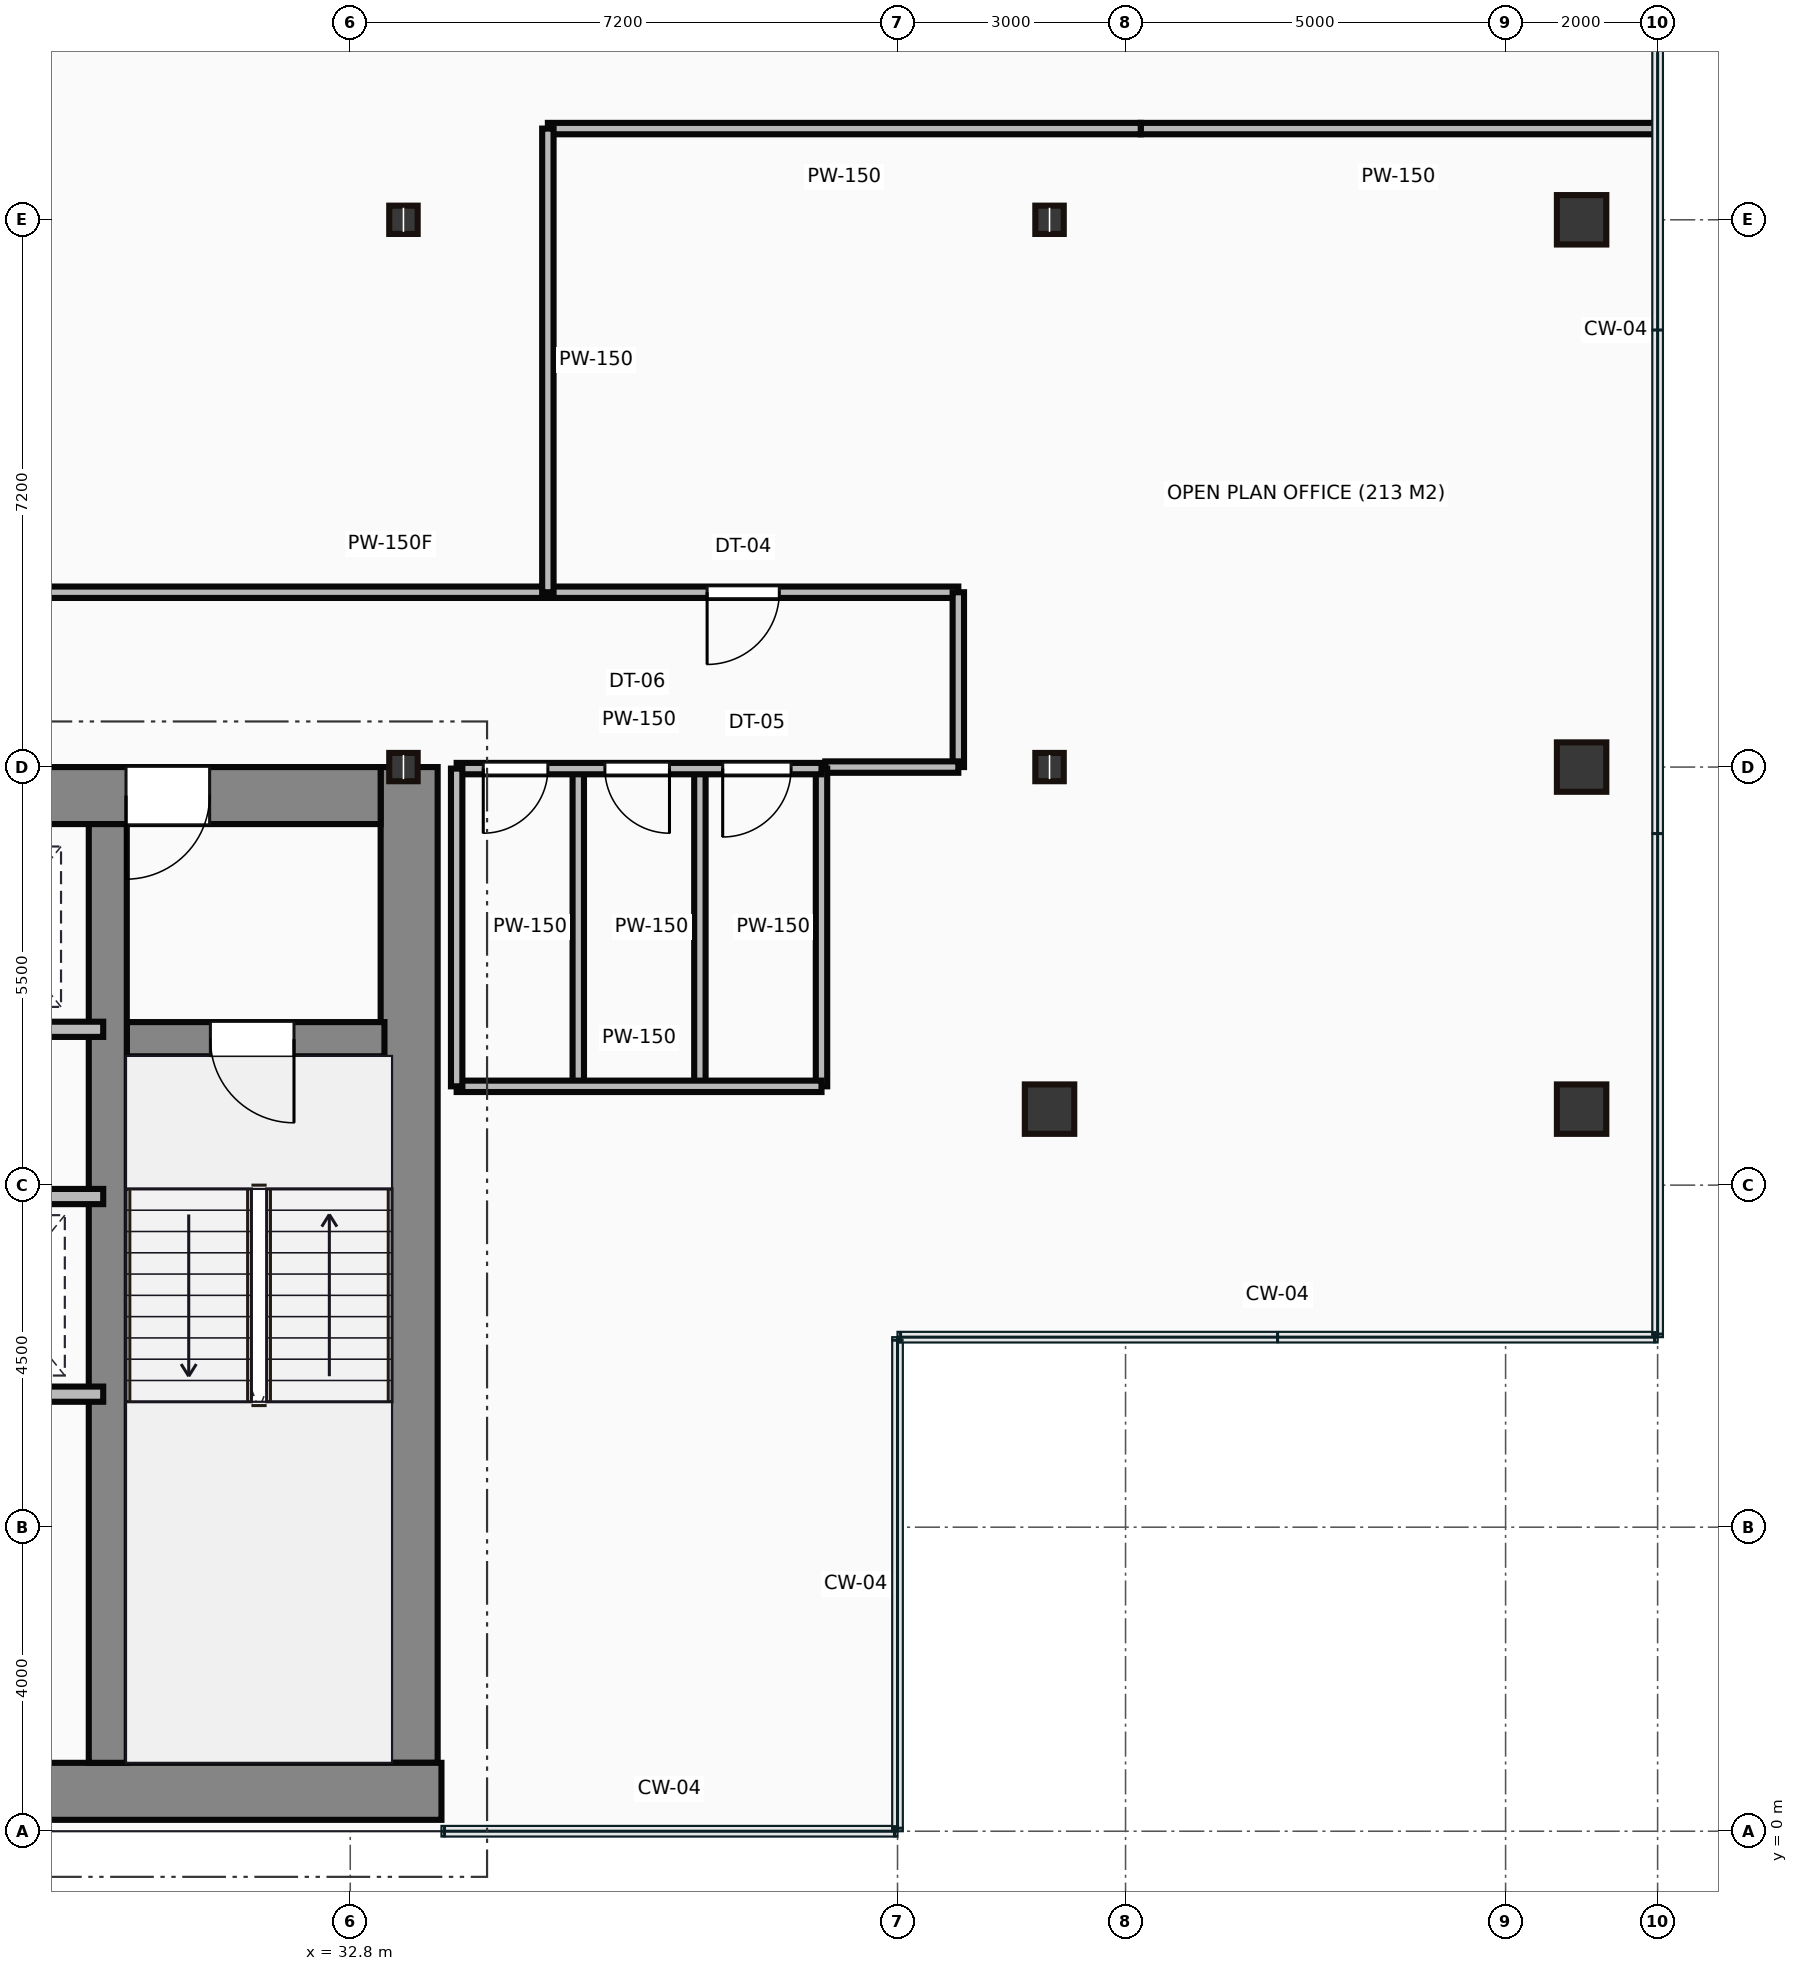
"""IFC4 building model, lengths in metres.
Left out: names, types, materials, properties, quantities, classifications, styles, units other than length and angle.
Written with IfcOpenShell. Run it as: python <this file> out.ifc"""

import sys

from ifc_helpers import new_model, si_unit, direction, frame, frame_2d, origin, origin_2d, place, context, subcontext, project, spatial, rectangle, hollow_rectangle, i_section, extrude, source, transform, mapped, element, fill, save


model = new_model("IFC4")
c1 = context("Model", 3, precision=1e-05, world=origin(), true_north=direction((0.0, 1.0)))
c2 = subcontext(c1, "Body", "Model", "MODEL_VIEW")
j1 = project(units=[si_unit("LENGTHUNIT", "METRE"), si_unit("PLANEANGLEUNIT", "RADIAN")], contexts=[c1])
p1 = place(None, origin())
s1 = spatial("IfcSite", under=j1, at=p1, CompositionType="ELEMENT")
p2 = place(p1, origin())
s2 = spatial("IfcBuilding", under=s1, at=p2, CompositionType="ELEMENT")
p3 = place(p2, frame((0.0, 0.0, 147.9)))
s3 = spatial("IfcBuildingStorey", under=s2, at=p3, CompositionType="ELEMENT", Elevation=147.9)
m1 = source(origin(), c2, "Body", "SweptSolid", [
    extrude(rectangle(XDim=29.5, YDim=0.75, at=frame_2d((14.75, 0.0))), origin(), (0.0, 0.0, 1.0), 3.65),
])
p4 = place(p3, frame((4.5, 0.525, 0.0), z_axis=(0.0, 0.0, 1.0), x_axis=(1.0, 0.0, 0.0)))
e1 = element("IfcWall", 1, at=p4, inside=s3, PredefinedType="SHEAR", context=c2, shape_type="MappedRepresentation", body=[
    mapped(m1, transform((0.0, 0.0, 0.0))),
])
m2 = source(origin(), c2, "Body", "SweptSolid", [
    extrude(rectangle(XDim=13.1, YDim=0.75, at=frame_2d((6.55, 0.0))), origin(), (0.0, 0.0, 1.0), 3.65),
])
p5 = place(p3, frame((33.575, 0.9, 0.0), z_axis=(0.0, 0.0, 1.0), x_axis=(0.0, 1.0, 0.0)))
e2 = element("IfcWall", 2, at=p5, inside=s3, PredefinedType="SHEAR", context=c2, shape_type="MappedRepresentation", body=[
    mapped(m2, transform((0.0, 0.0, 0.0))),
])
m3 = source(origin(), c2, "Body", "SweptSolid", [
    extrude(rectangle(XDim=12.6, YDim=0.75, at=frame_2d((6.3, 0.0))), origin(), (0.0, 0.0, 1.0), 3.65),
])
p6 = place(p3, frame((20.6, 13.625, 0.0), z_axis=(0.0, 0.0, 1.0), x_axis=(1.0, 0.0, 0.0)))
e3 = element("IfcWall", 3, at=p6, inside=s3, PredefinedType="SHEAR", context=c2, shape_type="MappedRepresentation", body=[
    mapped(m3, transform((0.0, 0.0, 0.0))),
])
p7 = place(p6, frame((9.25, 0.0, 0.0)))
e4 = element("IfcOpeningElement", 4, at=p7, cuts=e3, PredefinedType="OPENING", context=c2, shape_type="SweptSolid", body=[
    extrude(rectangle(XDim=1.1, YDim=2.15, at=frame_2d((0.55, 1.075))), frame((0.0, 0.385, 0.0), z_axis=(0.0, -1.0, 0.0), x_axis=(1.0, 0.0, 0.0)), (0.0, 0.0, 1.0), 0.77),
])
m4 = source(origin(), c2, "Body", "SweptSolid", [
    extrude(rectangle(XDim=12.35, YDim=0.5, at=frame_2d((6.175, 0.0))), origin(), (0.0, 0.0, 1.0), 3.65),
])
p8 = place(p3, frame((29.61, 0.9, 0.0), z_axis=(0.0, 0.0, 1.0), x_axis=(0.0, 1.0, 0.0)))
e5 = element("IfcWall", 5, at=p8, inside=s3, PredefinedType="SHEAR", context=c2, shape_type="MappedRepresentation", body=[
    mapped(m4, transform((0.0, 0.0, 0.0))),
])
m5 = source(origin(), c2, "Body", "SweptSolid", [
    extrude(rectangle(XDim=3.39, YDim=0.45, at=frame_2d((1.695, 0.0))), origin(), (0.0, 0.0, 1.0), 3.65),
])
p9 = place(p3, frame((29.86, 10.42, 0.0), z_axis=(0.0, 0.0, 1.0), x_axis=(1.0, 0.0, 0.0)))
e6 = element("IfcWall", 6, at=p9, inside=s3, PredefinedType="SHEAR", context=c2, shape_type="MappedRepresentation", body=[
    mapped(m5, transform((0.0, 0.0, 0.0))),
])
p10 = place(p9, frame((1.1, 0.0, 0.0)))
e7 = element("IfcOpeningElement", 7, at=p10, cuts=e6, PredefinedType="OPENING", context=c2, shape_type="SweptSolid", body=[
    extrude(rectangle(XDim=1.1, YDim=2.15, at=frame_2d((0.55, 1.075))), frame((0.0, 0.235, 0.0), z_axis=(0.0, -1.0, 0.0), x_axis=(1.0, 0.0, 0.0)), (0.0, 0.0, 1.0), 0.47),
])
m6 = source(origin(), c2, "Body", "SweptSolid", [
    extrude(i_section(OverallWidth=0.374, OverallDepth=0.372, WebThickness=0.016, FlangeThickness=0.026, at=origin_2d()), origin(), (0.0, 0.0, 1.0), 3.65),
])
for number, where, z_axis, x_axis in (
    (8, (33.5, 14.0, 0.0), (0.0, 0.0, 1.0), (1.0, 0.0, 0.0)),
    (9, (33.5, 21.2, 0.0), (0.0, 0.0, 1.0), (1.0, 0.0, 0.0)),
):
    element("IfcColumn", number, at=place(p3, frame(where, z_axis=z_axis, x_axis=x_axis)), inside=s3, PredefinedType="COLUMN", context=c2, shape_type="MappedRepresentation", body=[
        mapped(m6, transform((0.0, 0.0, 0.0))),
    ])
m7 = source(origin(), c2, "Body", "SweptSolid", [
    extrude(hollow_rectangle(XDim=0.65, YDim=0.65, WallThickness=0.032, at=origin_2d()), origin(), (0.0, 0.0, 1.0), 3.65),
])
p11 = place(p3, frame((42.0, 9.5, 0.0), z_axis=(0.0, 0.0, 1.0), x_axis=(1.0, 0.0, 0.0)))
e10 = element("IfcColumn", 10, at=p11, inside=s3, PredefinedType="COLUMN", context=c2, shape_type="MappedRepresentation", body=[
    mapped(m7, transform((0.0, 0.0, 0.0))),
])
for number, where, z_axis, x_axis in (
    (11, (42.0, 14.0, 0.0), (0.0, 0.0, 1.0), (1.0, 0.0, 0.0)),
    (12, (42.0, 21.2, 0.0), (0.0, 0.0, 1.0), (1.0, 0.0, 0.0)),
):
    element("IfcColumn", number, at=place(p3, frame(where, z_axis=z_axis, x_axis=x_axis)), inside=s3, PredefinedType="COLUMN", context=c2, shape_type="MappedRepresentation", body=[
        mapped(m6, transform((0.0, 0.0, 0.0))),
    ])
for number, where, z_axis, x_axis in (
    (13, (49.0, 9.5, 0.0), (0.0, 0.0, 1.0), (1.0, 0.0, 0.0)),
    (14, (49.0, 14.0, 0.0), (0.0, 0.0, 1.0), (1.0, 0.0, 0.0)),
    (15, (49.0, 21.2, 0.0), (0.0, 0.0, 1.0), (1.0, 0.0, 0.0)),
):
    element("IfcColumn", number, at=place(p3, frame(where, z_axis=z_axis, x_axis=x_axis)), inside=s3, PredefinedType="COLUMN", context=c2, shape_type="MappedRepresentation", body=[
        mapped(m7, transform((0.0, 0.0, 0.0))),
    ])
m8 = source(origin(), c2, "Body", "SweptSolid", [
    extrude(rectangle(XDim=8.8, YDim=0.2, at=frame_2d((4.4, 0.0))), origin(), (0.0, 0.0, 1.0), 3.4),
])
p12 = place(p3, frame((20.75, 10.55, 0.0), z_axis=(0.0, 0.0, 1.0), x_axis=(1.0, 0.0, 0.0)))
e16 = element("IfcWall", 16, at=p12, inside=s3, PredefinedType="PARTITIONING", context=c2, shape_type="MappedRepresentation", body=[
    mapped(m8, transform((0.0, 0.0, 0.0))),
])
m9 = source(origin(), c2, "Body", "SweptSolid", [
    extrude(rectangle(XDim=4.55, YDim=0.2, at=frame_2d((2.275, 0.0))), origin(), (0.0, 0.0, 1.0), 3.4),
])
for number, where, z_axis, x_axis in (
    (17, (25.0, 8.35, 0.0), (0.0, 0.0, 1.0), (1.0, 0.0, 0.0)),
    (18, (25.0, 5.75, 0.0), (0.0, 0.0, 1.0), (1.0, 0.0, 0.0)),
):
    element("IfcWall", number, at=place(p3, frame(where, z_axis=z_axis, x_axis=x_axis)), inside=s3, PredefinedType="PARTITIONING", context=c2, shape_type="MappedRepresentation", body=[
        mapped(m9, transform((0.0, 0.0, 0.0))),
    ])
m10 = source(origin(), c2, "Body", "SweptSolid", [
    extrude(rectangle(XDim=4.8, YDim=0.15, at=frame_2d((2.4, 0.0))), origin(), (0.0, 0.0, 1.0), 2.76),
])
p13 = place(p3, frame((34.2, 13.98, 0.0), z_axis=(0.0, 0.0, 1.0), x_axis=(1.0, 0.0, 0.0)))
e19 = element("IfcWall", 19, at=p13, inside=s3, PredefinedType="PARTITIONING", context=c2, shape_type="MappedRepresentation", body=[
    mapped(m10, transform((0.0, 0.0, 0.0))),
])
p14 = place(p13, frame((0.35, 0.0, 0.0)))
e20 = element("IfcOpeningElement", 20, at=p14, cuts=e19, PredefinedType="OPENING", context=c2, shape_type="SweptSolid", body=[
    extrude(rectangle(XDim=0.85, YDim=2.1, at=frame_2d((0.425, 1.05))), frame((0.0, 0.085, 0.0), z_axis=(0.0, -1.0, 0.0), x_axis=(1.0, 0.0, 0.0)), (0.0, 0.0, 1.0), 0.17),
])
p15 = place(p13, frame((1.95, 0.0, 0.0)))
e21 = element("IfcOpeningElement", 21, at=p15, cuts=e19, PredefinedType="OPENING", context=c2, shape_type="SweptSolid", body=[
    extrude(rectangle(XDim=0.85, YDim=2.1, at=frame_2d((0.425, 1.05))), frame((0.0, 0.085, 0.0), z_axis=(0.0, -1.0, 0.0), x_axis=(1.0, 0.0, 0.0)), (0.0, 0.0, 1.0), 0.17),
])
p16 = place(p13, frame((3.5, 0.0, 0.0)))
e22 = element("IfcOpeningElement", 22, at=p16, cuts=e19, PredefinedType="OPENING", context=c2, shape_type="SweptSolid", body=[
    extrude(rectangle(XDim=0.9, YDim=2.1, at=frame_2d((0.45, 1.05))), frame((0.0, 0.085, 0.0), z_axis=(0.0, -1.0, 0.0), x_axis=(1.0, 0.0, 0.0)), (0.0, 0.0, 1.0), 0.17),
])
m11 = source(origin(), c2, "Body", "SweptSolid", [
    extrude(rectangle(XDim=4.8, YDim=0.15, at=frame_2d((2.4, 0.0))), origin(), (0.0, 0.0, 1.0), 3.4),
])
p17 = place(p3, frame((34.2, 9.8, 0.0), z_axis=(0.0, 0.0, 1.0), x_axis=(1.0, 0.0, 0.0)))
e23 = element("IfcWall", 23, at=p17, inside=s3, PredefinedType="PARTITIONING", context=c2, shape_type="MappedRepresentation", body=[
    mapped(m11, transform((0.0, 0.0, 0.0))),
])
m12 = source(origin(), c2, "Body", "SweptSolid", [
    extrude(rectangle(XDim=4.18, YDim=0.15, at=frame_2d((2.09, 0.0))), origin(), (0.0, 0.0, 1.0), 3.4),
])
for number, where, z_axis, x_axis in (
    (24, (39.0, 9.8, 0.0), (0.0, 0.0, 1.0), (0.0, 1.0, 0.0)),
    (25, (34.2, 9.8, 0.0), (0.0, 0.0, 1.0), (0.0, 1.0, 0.0)),
    (26, (35.8, 9.8, 0.0), (0.0, 0.0, 1.0), (0.0, 1.0, 0.0)),
    (27, (37.4, 9.8, 0.0), (0.0, 0.0, 1.0), (0.0, 1.0, 0.0)),
):
    element("IfcWall", number, at=place(p3, frame(where, z_axis=z_axis, x_axis=x_axis)), inside=s3, PredefinedType="PARTITIONING", context=c2, shape_type="MappedRepresentation", body=[
        mapped(m12, transform((0.0, 0.0, 0.0))),
    ])
m13 = source(origin(), c2, "Body", "SweptSolid", [
    extrude(rectangle(XDim=14.95, YDim=0.15, at=frame_2d((7.475, 0.0))), origin(), (0.0, 0.0, 1.0), 3.4),
])
p18 = place(p3, frame((25.85, 16.3, 0.0), z_axis=(0.0, 0.0, 1.0), x_axis=(1.0, 0.0, 0.0)))
e28 = element("IfcWall", 28, at=p18, inside=s3, PredefinedType="PARTITIONING", context=c2, shape_type="MappedRepresentation", body=[
    mapped(m13, transform((0.0, 0.0, 0.0))),
])
p19 = place(p18, frame((11.645, 0.0, 0.0)))
e29 = element("IfcOpeningElement", 29, at=p19, cuts=e28, PredefinedType="OPENING", context=c2, shape_type="SweptSolid", body=[
    extrude(rectangle(XDim=0.95, YDim=2.15, at=frame_2d((0.475, 1.075))), frame((0.0, 0.085, 0.0), z_axis=(0.0, -1.0, 0.0), x_axis=(1.0, 0.0, 0.0)), (0.0, 0.0, 1.0), 0.17),
])
m14 = source(origin(), c2, "Body", "SweptSolid", [
    extrude(rectangle(XDim=2.3, YDim=0.15, at=frame_2d((1.15, 0.0))), origin(), (0.0, 0.0, 1.0), 3.4),
])
p20 = place(p3, frame((40.8, 16.3, 0.0), z_axis=(0.0, 0.0, 1.0), x_axis=(0.0, -1.0, 0.0)))
e30 = element("IfcWall", 30, at=p20, inside=s3, PredefinedType="PARTITIONING", context=c2, shape_type="MappedRepresentation", body=[
    mapped(m14, transform((0.0, 0.0, 0.0))),
])
m15 = source(origin(), c2, "Body", "SweptSolid", [
    extrude(rectangle(XDim=1.75, YDim=0.15, at=frame_2d((0.875, 0.0))), origin(), (0.0, 0.0, 1.0), 2.76),
])
p21 = place(p3, frame((40.8, 14.0, 0.0), z_axis=(0.0, 0.0, 1.0), x_axis=(-1.0, 0.0, 0.0)))
e31 = element("IfcWall", 31, at=p21, inside=s3, PredefinedType="PARTITIONING", context=c2, shape_type="MappedRepresentation", body=[
    mapped(m15, transform((0.0, 0.0, 0.0))),
])
m16 = source(origin(), c2, "Body", "SweptSolid", [
    extrude(rectangle(XDim=6.78, YDim=0.15, at=frame_2d((3.39, 0.0))), origin(), (0.0, 0.0, 1.0), 3.4),
])
p22 = place(p3, frame((49.98, 22.4, 0.0), z_axis=(0.0, 0.0, 1.0), x_axis=(-1.0, 0.0, 0.0)))
e32 = element("IfcWall", 32, at=p22, inside=s3, PredefinedType="PARTITIONING", context=c2, shape_type="MappedRepresentation", body=[
    mapped(m16, transform((0.0, 0.0, 0.0))),
])
m17 = source(origin(), c2, "Body", "SweptSolid", [
    extrude(rectangle(XDim=7.8, YDim=0.15, at=frame_2d((3.9, 0.0))), origin(), (0.0, 0.0, 1.0), 3.4),
])
p23 = place(p3, frame((43.2, 22.4, 0.0), z_axis=(0.0, 0.0, 1.0), x_axis=(-1.0, 0.0, 0.0)))
e33 = element("IfcWall", 33, at=p23, inside=s3, PredefinedType="PARTITIONING", context=c2, shape_type="MappedRepresentation", body=[
    mapped(m17, transform((0.0, 0.0, 0.0))),
])
m18 = source(origin(), c2, "Body", "SweptSolid", [
    extrude(rectangle(XDim=6.1, YDim=0.15, at=frame_2d((3.05, 0.0))), origin(), (0.0, 0.0, 1.0), 3.4),
])
p24 = place(p3, frame((35.4, 22.4, 0.0), z_axis=(0.0, 0.0, 1.0), x_axis=(0.0, -1.0, 0.0)))
e34 = element("IfcWall", 34, at=p24, inside=s3, PredefinedType="PARTITIONING", context=c2, shape_type="MappedRepresentation", body=[
    mapped(m18, transform((0.0, 0.0, 0.0))),
])
m19 = source(origin(), c2, "Body", "SweptSolid", [
    extrude(rectangle(XDim=1.1, YDim=2.15, at=frame_2d((0.55, 1.075))), frame((0.0, 0.025, 0.0), z_axis=(0.0, -1.0, 0.0), x_axis=(1.0, 0.0, 0.0)), (0.0, 0.0, 1.0), 0.05),
])
p25 = place(p10, frame((1.1, 0.0, 0.0), z_axis=(0.0, 0.0, 1.0), x_axis=(-1.0, 0.0, 0.0)))
e35 = element("IfcDoor", 35, at=p25, inside=s3, OperationType="SINGLE_SWING_RIGHT", PredefinedType="DOOR", context=c2, shape_type="MappedRepresentation", body=[
    mapped(m19, transform((0.0, 0.0, 0.0))),
])
fill(e7, e35)
p26 = place(p7, origin())
e36 = element("IfcDoor", 36, at=p26, inside=s3, OperationType="SINGLE_SWING_LEFT", PredefinedType="DOOR", context=c2, shape_type="MappedRepresentation", body=[
    mapped(m19, transform((0.0, 0.0, 0.0))),
])
fill(e4, e36)
m20 = source(origin(), c2, "Body", "SweptSolid", [
    extrude(rectangle(XDim=0.85, YDim=2.1, at=frame_2d((0.425, 1.05))), frame((0.0, 0.025, 0.0), z_axis=(0.0, -1.0, 0.0), x_axis=(1.0, 0.0, 0.0)), (0.0, 0.0, 1.0), 0.05),
])
p27 = place(p14, frame((0.85, 0.0, 0.0), z_axis=(0.0, 0.0, 1.0), x_axis=(-1.0, 0.0, 0.0)))
e37 = element("IfcDoor", 37, at=p27, inside=s3, OperationType="SINGLE_SWING_LEFT", PredefinedType="DOOR", context=c2, shape_type="MappedRepresentation", body=[
    mapped(m20, transform((0.0, 0.0, 0.0))),
])
fill(e20, e37)
p28 = place(p15, frame((0.85, 0.0, 0.0), z_axis=(0.0, 0.0, 1.0), x_axis=(-1.0, 0.0, 0.0)))
e38 = element("IfcDoor", 38, at=p28, inside=s3, OperationType="SINGLE_SWING_RIGHT", PredefinedType="DOOR", context=c2, shape_type="MappedRepresentation", body=[
    mapped(m20, transform((0.0, 0.0, 0.0))),
])
fill(e21, e38)
m21 = source(origin(), c2, "Body", "SweptSolid", [
    extrude(rectangle(XDim=0.9, YDim=2.1, at=frame_2d((0.45, 1.05))), frame((0.0, 0.025, 0.0), z_axis=(0.0, -1.0, 0.0), x_axis=(1.0, 0.0, 0.0)), (0.0, 0.0, 1.0), 0.05),
])
p29 = place(p16, frame((0.9, 0.0, 0.0), z_axis=(0.0, 0.0, 1.0), x_axis=(-1.0, 0.0, 0.0)))
e39 = element("IfcDoor", 39, at=p29, inside=s3, OperationType="SINGLE_SWING_LEFT", PredefinedType="DOOR", context=c2, shape_type="MappedRepresentation", body=[
    mapped(m21, transform((0.0, 0.0, 0.0))),
])
fill(e22, e39)
m22 = source(origin(), c2, "Body", "SweptSolid", [
    extrude(rectangle(XDim=0.95, YDim=2.15, at=frame_2d((0.475, 1.075))), frame((0.0, 0.025, 0.0), z_axis=(0.0, -1.0, 0.0), x_axis=(1.0, 0.0, 0.0)), (0.0, 0.0, 1.0), 0.05),
])
p30 = place(p19, origin())
e40 = element("IfcDoor", 40, at=p30, inside=s3, OperationType="SINGLE_SWING_LEFT", PredefinedType="DOOR", context=c2, shape_type="MappedRepresentation", body=[
    mapped(m22, transform((0.0, 0.0, 0.0))),
])
fill(e29, e40)
save(model, sys.argv[1])
